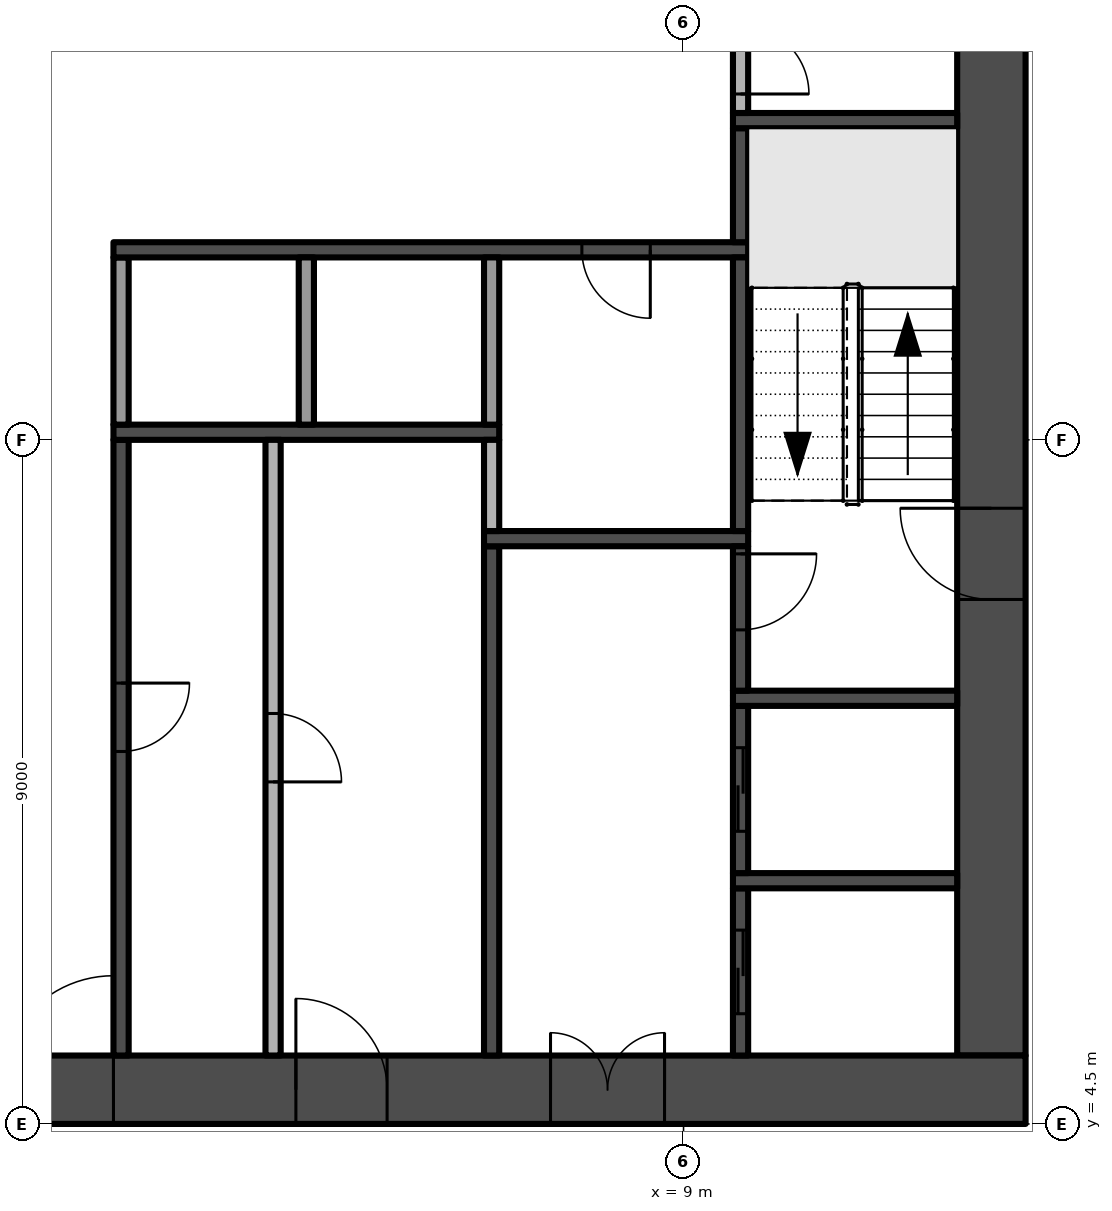
"""IFC4 building model, lengths in metres.
Left out: names, types, materials, properties, quantities, classifications, styles, units other than length and angle.
Written with IfcOpenShell. Run it as: python <this file> out.ifc"""

import sys

from ifc_helpers import new_model, si_unit, direction, frame, frame_2d, origin, place, context, subcontext, project, spatial, rectangle, extrude, element, fill, save


model = new_model("IFC4")
c1 = context("Model", 3, precision=1e-05, world=origin(), true_north=direction((0.0, 1.0)))
c2 = subcontext(c1, "Body", "Model", "MODEL_VIEW")
j1 = project(units=[si_unit("LENGTHUNIT", "METRE"), si_unit("PLANEANGLEUNIT", "RADIAN")], contexts=[c1])
p1 = place(None, origin())
s1 = spatial("IfcSite", under=j1, at=p1, CompositionType="ELEMENT")
p2 = place(p1, origin())
s2 = spatial("IfcBuilding", under=s1, at=p2, CompositionType="ELEMENT")
p3 = place(p2, frame((0.0, 0.0, 111.2)))
s3 = spatial("IfcBuildingStorey", under=s2, at=p3, CompositionType="ELEMENT", Elevation=111.2)
p4 = place(p3, frame((-13.5, 4.95, -0.3), z_axis=(0.0, 0.0, 1.0), x_axis=(1.0, 0.0, 0.0)))
e1 = element("IfcWall", 1, at=p4, inside=s3, PredefinedType="SHEAR", context=c2, shape_type="SweptSolid", body=[
    extrude(rectangle(XDim=27.0, YDim=0.9, at=frame_2d((13.5, 0.0))), origin(), (0.0, 0.0, 1.0), 3.8),
])
p5 = place(p4, frame((12.0, 0.0, 0.3)))
e2 = element("IfcOpeningElement", 2, at=p5, cuts=e1, PredefinedType="OPENING", context=c2, shape_type="SweptSolid", body=[
    extrude(rectangle(XDim=3.0, YDim=2.4, at=frame_2d((1.5, 1.2))), frame((0.0, 0.46, 0.0), z_axis=(0.0, -1.0, 0.0), x_axis=(1.0, 0.0, 0.0)), (0.0, 0.0, 1.0), 0.92),
])
p6 = place(p4, frame((4.9, 0.0, 0.3)))
e3 = element("IfcOpeningElement", 3, at=p6, cuts=e1, PredefinedType="OPENING", context=c2, shape_type="SweptSolid", body=[
    extrude(rectangle(XDim=1.2, YDim=2.2, at=frame_2d((0.6, 1.1))), frame((0.0, 0.46, 0.0), z_axis=(0.0, -1.0, 0.0), x_axis=(1.0, 0.0, 0.0)), (0.0, 0.0, 1.0), 0.92),
])
p7 = place(p4, frame((20.75, 0.0, 0.3)))
e4 = element("IfcOpeningElement", 4, at=p7, cuts=e1, PredefinedType="OPENING", context=c2, shape_type="SweptSolid", body=[
    extrude(rectangle(XDim=1.5, YDim=2.2, at=frame_2d((0.75, 1.1))), frame((0.0, 0.46, 0.0), z_axis=(0.0, -1.0, 0.0), x_axis=(1.0, 0.0, 0.0)), (0.0, 0.0, 1.0), 0.92),
])
p8 = place(p4, frame((17.4, 0.0, 0.3)))
e5 = element("IfcOpeningElement", 5, at=p8, cuts=e1, PredefinedType="OPENING", context=c2, shape_type="SweptSolid", body=[
    extrude(rectangle(XDim=1.2, YDim=2.2, at=frame_2d((0.6, 1.1))), frame((0.0, 0.46, 0.0), z_axis=(0.0, -1.0, 0.0), x_axis=(1.0, 0.0, 0.0)), (0.0, 0.0, 1.0), 0.92),
])
p9 = place(p3, frame((13.05, 5.4, -0.3), z_axis=(0.0, 0.0, 1.0), x_axis=(0.0, 1.0, 0.0)))
e6 = element("IfcWall", 6, at=p9, inside=s3, PredefinedType="SHEAR", context=c2, shape_type="SweptSolid", body=[
    extrude(rectangle(XDim=16.2, YDim=0.9, at=frame_2d((8.1, 0.0))), origin(), (0.0, 0.0, 1.0), 3.8),
])
p10 = place(p9, frame((6.0, 0.0, 0.3)))
e7 = element("IfcOpeningElement", 7, at=p10, cuts=e6, PredefinedType="OPENING", context=c2, shape_type="SweptSolid", body=[
    extrude(rectangle(XDim=1.2, YDim=2.2, at=frame_2d((0.6, 1.1))), frame((0.0, 0.46, 0.0), z_axis=(0.0, -1.0, 0.0), x_axis=(1.0, 0.0, 0.0)), (0.0, 0.0, 1.0), 0.92),
])
p11 = place(p3, frame((1.6, 13.5, 0.0), z_axis=(0.0, 0.0, 1.0), x_axis=(0.0, -1.0, 0.0)))
e8 = element("IfcWall", 8, at=p11, inside=s3, PredefinedType="SHEAR", context=c2, shape_type="SweptSolid", body=[
    extrude(rectangle(XDim=8.1, YDim=0.2, at=frame_2d((4.05, 0.0))), origin(), (0.0, 0.0, 1.0), 3.5),
])
p12 = place(p11, frame((3.2, 0.0, 0.0)))
e9 = element("IfcOpeningElement", 9, at=p12, cuts=e8, PredefinedType="OPENING", context=c2, shape_type="SweptSolid", body=[
    extrude(rectangle(XDim=0.9, YDim=2.1, at=frame_2d((0.45, 1.05))), frame((0.0, 0.11, 0.0), z_axis=(0.0, -1.0, 0.0), x_axis=(1.0, 0.0, 0.0)), (0.0, 0.0, 1.0), 0.22),
])
p13 = place(p3, frame((1.5, 13.6, 0.0), z_axis=(0.0, 0.0, 1.0), x_axis=(1.0, 0.0, 0.0)))
e10 = element("IfcWall", 10, at=p13, inside=s3, PredefinedType="SHEAR", context=c2, shape_type="SweptSolid", body=[
    extrude(rectangle(XDim=5.075, YDim=0.2, at=frame_2d((2.538, 0.0))), origin(), (0.0, 0.0, 1.0), 3.5),
])
p14 = place(p3, frame((1.6, 13.7, 0.0), z_axis=(0.0, 0.0, 1.0), x_axis=(0.0, 1.0, 0.0)))
e11 = element("IfcWall", 11, at=p14, inside=s3, PredefinedType="PARTITIONING", context=c2, shape_type="SweptSolid", body=[
    extrude(rectangle(XDim=2.2, YDim=0.2, at=frame_2d((1.1, 0.0))), origin(), (0.0, 0.0, 1.0), 3.5),
])
p15 = place(p3, frame((9.85, 16.0, 0.0), z_axis=(0.0, 0.0, 1.0), x_axis=(-1.0, 0.0, 0.0)))
e12 = element("IfcWall", 12, at=p15, inside=s3, PredefinedType="SHEAR", context=c2, shape_type="SweptSolid", body=[
    extrude(rectangle(XDim=8.35, YDim=0.2, at=frame_2d((4.175, 0.0))), origin(), (0.0, 0.0, 1.0), 3.5),
])
p16 = place(p15, frame((1.288, 0.0, 0.0)))
e13 = element("IfcOpeningElement", 13, at=p16, cuts=e12, PredefinedType="OPENING", context=c2, shape_type="SweptSolid", body=[
    extrude(rectangle(XDim=0.9, YDim=2.1, at=frame_2d((0.45, 1.05))), frame((0.0, 0.11, 0.0), z_axis=(0.0, -1.0, 0.0), x_axis=(1.0, 0.0, 0.0)), (0.0, 0.0, 1.0), 0.22),
])
p17 = place(p3, frame((3.6, 13.5, 0.0), z_axis=(0.0, 0.0, 1.0), x_axis=(0.0, -1.0, 0.0)))
e14 = element("IfcWall", 14, at=p17, inside=s3, PredefinedType="PARTITIONING", context=c2, shape_type="SweptSolid", body=[
    extrude(rectangle(XDim=8.1, YDim=0.2, at=frame_2d((4.05, 0.0))), origin(), (0.0, 0.0, 1.0), 3.5),
])
p18 = place(p17, frame((3.6, 0.0, 0.0)))
e15 = element("IfcOpeningElement", 15, at=p18, cuts=e14, PredefinedType="OPENING", context=c2, shape_type="SweptSolid", body=[
    extrude(rectangle(XDim=0.9, YDim=2.1, at=frame_2d((0.45, 1.05))), frame((0.0, 0.11, 0.0), z_axis=(0.0, -1.0, 0.0), x_axis=(1.0, 0.0, 0.0)), (0.0, 0.0, 1.0), 0.22),
])
p19 = place(p3, frame((4.037, 13.7, 0.0), z_axis=(0.0, 0.0, 1.0), x_axis=(0.0, 1.0, 0.0)))
e16 = element("IfcWall", 16, at=p19, inside=s3, PredefinedType="PARTITIONING", context=c2, shape_type="SweptSolid", body=[
    extrude(rectangle(XDim=2.2, YDim=0.2, at=frame_2d((1.1, 0.0))), origin(), (0.0, 0.0, 1.0), 3.5),
])
p20 = place(p3, frame((6.475, 5.4, 0.0), z_axis=(0.0, 0.0, 1.0), x_axis=(0.0, 1.0, 0.0)))
e17 = element("IfcWall", 17, at=p20, inside=s3, PredefinedType="SHEAR", context=c2, shape_type="SweptSolid", body=[
    extrude(rectangle(XDim=6.7, YDim=0.2, at=frame_2d((3.35, 0.0))), origin(), (0.0, 0.0, 1.0), 3.5),
])
p21 = place(p3, frame((6.375, 12.2, 0.0), z_axis=(0.0, 0.0, 1.0), x_axis=(1.0, 0.0, 0.0)))
e18 = element("IfcWall", 18, at=p21, inside=s3, PredefinedType="SHEAR", context=c2, shape_type="SweptSolid", body=[
    extrude(rectangle(XDim=3.475, YDim=0.2, at=frame_2d((1.738, 0.0))), origin(), (0.0, 0.0, 1.0), 3.5),
])
p22 = place(p3, frame((6.475, 12.3, 0.0), z_axis=(0.0, 0.0, 1.0), x_axis=(0.0, 1.0, 0.0)))
e19 = element("IfcWall", 19, at=p22, inside=s3, PredefinedType="PARTITIONING", context=c2, shape_type="SweptSolid", body=[
    extrude(rectangle(XDim=1.2, YDim=0.2, at=frame_2d((0.6, 0.0))), origin(), (0.0, 0.0, 1.0), 3.5),
])
p23 = place(p3, frame((6.475, 13.7, 0.0), z_axis=(0.0, 0.0, 1.0), x_axis=(0.0, 1.0, 0.0)))
e20 = element("IfcWall", 20, at=p23, inside=s3, PredefinedType="PARTITIONING", context=c2, shape_type="SweptSolid", body=[
    extrude(rectangle(XDim=2.2, YDim=0.2, at=frame_2d((1.1, 0.0))), origin(), (0.0, 0.0, 1.0), 3.5),
])
p24 = place(p3, frame((9.75, 5.4, 0.0), z_axis=(0.0, 0.0, 1.0), x_axis=(0.0, 1.0, 0.0)))
e21 = element("IfcWall", 21, at=p24, inside=s3, PredefinedType="SHEAR", context=c2, shape_type="SweptSolid", body=[
    extrude(rectangle(XDim=2.2, YDim=0.2, at=frame_2d((1.1, 0.0))), origin(), (0.0, 0.0, 1.0), 3.5),
])
p25 = place(p24, frame((0.55, 0.0, 0.0)))
e22 = element("IfcOpeningElement", 22, at=p25, cuts=e21, PredefinedType="OPENING", context=c2, shape_type="SweptSolid", body=[
    extrude(rectangle(XDim=1.1, YDim=2.1, at=frame_2d((0.55, 1.05))), frame((0.0, 0.11, 0.0), z_axis=(0.0, -1.0, 0.0), x_axis=(1.0, 0.0, 0.0)), (0.0, 0.0, 1.0), 0.22),
])
p26 = place(p3, frame((9.65, 7.7, 0.0), z_axis=(0.0, 0.0, 1.0), x_axis=(1.0, 0.0, 0.0)))
e23 = element("IfcWall", 23, at=p26, inside=s3, PredefinedType="SHEAR", context=c2, shape_type="SweptSolid", body=[
    extrude(rectangle(XDim=2.95, YDim=0.2, at=frame_2d((1.475, 0.0))), origin(), (0.0, 0.0, 1.0), 3.5),
])
p27 = place(p3, frame((9.75, 7.8, 0.0), z_axis=(0.0, 0.0, 1.0), x_axis=(0.0, 1.0, 0.0)))
e24 = element("IfcWall", 24, at=p27, inside=s3, PredefinedType="SHEAR", context=c2, shape_type="SweptSolid", body=[
    extrude(rectangle(XDim=2.2, YDim=0.2, at=frame_2d((1.1, 0.0))), origin(), (0.0, 0.0, 1.0), 3.5),
])
p28 = place(p27, frame((0.55, 0.0, 0.0)))
e25 = element("IfcOpeningElement", 25, at=p28, cuts=e24, PredefinedType="OPENING", context=c2, shape_type="SweptSolid", body=[
    extrude(rectangle(XDim=1.1, YDim=2.1, at=frame_2d((0.55, 1.05))), frame((0.0, 0.11, 0.0), z_axis=(0.0, -1.0, 0.0), x_axis=(1.0, 0.0, 0.0)), (0.0, 0.0, 1.0), 0.22),
])
p29 = place(p3, frame((9.65, 10.1, 0.0), z_axis=(0.0, 0.0, 1.0), x_axis=(1.0, 0.0, 0.0)))
e26 = element("IfcWall", 26, at=p29, inside=s3, PredefinedType="SHEAR", context=c2, shape_type="SweptSolid", body=[
    extrude(rectangle(XDim=2.95, YDim=0.2, at=frame_2d((1.475, 0.0))), origin(), (0.0, 0.0, 1.0), 3.5),
])
p30 = place(p3, frame((9.75, 12.1, 0.0), z_axis=(0.0, 0.0, 1.0), x_axis=(0.0, -1.0, 0.0)))
e27 = element("IfcWall", 27, at=p30, inside=s3, PredefinedType="SHEAR", context=c2, shape_type="SweptSolid", body=[
    extrude(rectangle(XDim=1.9, YDim=0.2, at=frame_2d((0.95, 0.0))), origin(), (0.0, 0.0, 1.0), 3.5),
])
p31 = place(p30, frame((0.1, 0.0, 0.0)))
e28 = element("IfcOpeningElement", 28, at=p31, cuts=e27, PredefinedType="OPENING", context=c2, shape_type="SweptSolid", body=[
    extrude(rectangle(XDim=1.0, YDim=2.2, at=frame_2d((0.5, 1.1))), frame((0.0, 0.11, 0.0), z_axis=(0.0, -1.0, 0.0), x_axis=(1.0, 0.0, 0.0)), (0.0, 0.0, 1.0), 0.22),
])
p32 = place(p3, frame((9.75, 12.3, 0.0), z_axis=(0.0, 0.0, 1.0), x_axis=(0.0, 1.0, 0.0)))
e29 = element("IfcWall", 29, at=p32, inside=s3, PredefinedType="SHEAR", context=c2, shape_type="SweptSolid", body=[
    extrude(rectangle(XDim=3.6, YDim=0.2, at=frame_2d((1.8, 0.0))), origin(), (0.0, 0.0, 1.0), 3.5),
])
p33 = place(p3, frame((9.75, 16.1, 0.0), z_axis=(0.0, 0.0, 1.0), x_axis=(0.0, 1.0, 0.0)))
e30 = element("IfcWall", 30, at=p33, inside=s3, PredefinedType="SHEAR", context=c2, shape_type="SweptSolid", body=[
    extrude(rectangle(XDim=1.5, YDim=0.2, at=frame_2d((0.75, 0.0))), origin(), (0.0, 0.0, 1.0), 3.5),
])
p34 = place(p3, frame((9.65, 17.7, 0.0), z_axis=(0.0, 0.0, 1.0), x_axis=(1.0, 0.0, 0.0)))
e31 = element("IfcWall", 31, at=p34, inside=s3, PredefinedType="SHEAR", context=c2, shape_type="SweptSolid", body=[
    extrude(rectangle(XDim=2.95, YDim=0.2, at=frame_2d((1.475, 0.0))), origin(), (0.0, 0.0, 1.0), 3.5),
])
p35 = place(p3, frame((9.75, 19.2, 0.0), z_axis=(0.0, 0.0, 1.0), x_axis=(0.0, -1.0, 0.0)))
e32 = element("IfcWall", 32, at=p35, inside=s3, PredefinedType="PARTITIONING", context=c2, shape_type="SweptSolid", body=[
    extrude(rectangle(XDim=1.4, YDim=0.2, at=frame_2d((0.7, 0.0))), origin(), (0.0, 0.0, 1.0), 3.5),
])
p36 = place(p35, frame((0.25, 0.0, 0.0)))
e33 = element("IfcOpeningElement", 33, at=p36, cuts=e32, PredefinedType="OPENING", context=c2, shape_type="SweptSolid", body=[
    extrude(rectangle(XDim=0.9, YDim=2.1, at=frame_2d((0.45, 1.05))), frame((0.0, 0.11, 0.0), z_axis=(0.0, -1.0, 0.0), x_axis=(1.0, 0.0, 0.0)), (0.0, 0.0, 1.0), 0.22),
])
p37 = place(p5, frame((3.0, 0.0, 0.0), z_axis=(0.0, 0.0, 1.0), x_axis=(-1.0, 0.0, 0.0)))
e34 = element("IfcDoor", 34, at=p37, inside=s3, OperationType="DOUBLE_DOOR_SINGLE_SWING", PredefinedType="DOOR", context=c2, shape_type="SweptSolid", body=[
    extrude(rectangle(XDim=3.0, YDim=2.4, at=frame_2d((1.5, 1.2))), frame((0.0, 0.025, 0.0), z_axis=(0.0, -1.0, 0.0), x_axis=(1.0, 0.0, 0.0)), (0.0, 0.0, 1.0), 0.05),
])
fill(e2, e34)
p38 = place(p10, frame((1.2, 0.0, 0.0), z_axis=(0.0, 0.0, 1.0), x_axis=(-1.0, 0.0, 0.0)))
e35 = element("IfcDoor", 35, at=p38, inside=s3, OperationType="SINGLE_SWING_LEFT", PredefinedType="DOOR", context=c2, shape_type="SweptSolid", body=[
    extrude(rectangle(XDim=1.2, YDim=2.2, at=frame_2d((0.6, 1.1))), frame((0.0, 0.025, 0.0), z_axis=(0.0, -1.0, 0.0), x_axis=(1.0, 0.0, 0.0)), (0.0, 0.0, 1.0), 0.05),
])
fill(e7, e35)
p39 = place(p7, frame((1.5, 0.0, 0.0), z_axis=(0.0, 0.0, 1.0), x_axis=(-1.0, 0.0, 0.0)))
e36 = element("IfcDoor", 36, at=p39, inside=s3, OperationType="DOUBLE_DOOR_SINGLE_SWING", PredefinedType="DOOR", context=c2, shape_type="SweptSolid", body=[
    extrude(rectangle(XDim=1.5, YDim=2.2, at=frame_2d((0.75, 1.1))), frame((0.0, 0.025, 0.0), z_axis=(0.0, -1.0, 0.0), x_axis=(1.0, 0.0, 0.0)), (0.0, 0.0, 1.0), 0.05),
])
fill(e4, e36)
p40 = place(p8, frame((1.2, 0.0, 0.0), z_axis=(0.0, 0.0, 1.0), x_axis=(-1.0, 0.0, 0.0)))
e37 = element("IfcDoor", 37, at=p40, inside=s3, OperationType="SINGLE_SWING_RIGHT", PredefinedType="DOOR", context=c2, shape_type="SweptSolid", body=[
    extrude(rectangle(XDim=1.2, YDim=2.2, at=frame_2d((0.6, 1.1))), frame((0.0, 0.025, 0.0), z_axis=(0.0, -1.0, 0.0), x_axis=(1.0, 0.0, 0.0)), (0.0, 0.0, 1.0), 0.05),
])
fill(e5, e37)
p41 = place(p31, origin())
e38 = element("IfcDoor", 38, at=p41, inside=s3, OperationType="SINGLE_SWING_LEFT", PredefinedType="DOOR", context=c2, shape_type="SweptSolid", body=[
    extrude(rectangle(XDim=1.0, YDim=2.2, at=frame_2d((0.5, 1.1))), frame((0.0, 0.025, 0.0), z_axis=(0.0, -1.0, 0.0), x_axis=(1.0, 0.0, 0.0)), (0.0, 0.0, 1.0), 0.05),
])
fill(e28, e38)
p42 = place(p25, origin())
e39 = element("IfcDoor", 39, at=p42, inside=s3, OperationType="SLIDING_TO_RIGHT", PredefinedType="DOOR", context=c2, shape_type="SweptSolid", body=[
    extrude(rectangle(XDim=1.1, YDim=2.1, at=frame_2d((0.55, 1.05))), frame((0.0, 0.025, 0.0), z_axis=(0.0, -1.0, 0.0), x_axis=(1.0, 0.0, 0.0)), (0.0, 0.0, 1.0), 0.05),
])
fill(e22, e39)
p43 = place(p28, origin())
e40 = element("IfcDoor", 40, at=p43, inside=s3, OperationType="SLIDING_TO_RIGHT", PredefinedType="DOOR", context=c2, shape_type="SweptSolid", body=[
    extrude(rectangle(XDim=1.1, YDim=2.1, at=frame_2d((0.55, 1.05))), frame((0.0, 0.025, 0.0), z_axis=(0.0, -1.0, 0.0), x_axis=(1.0, 0.0, 0.0)), (0.0, 0.0, 1.0), 0.05),
])
fill(e25, e40)
p44 = place(p12, origin())
e41 = element("IfcDoor", 41, at=p44, inside=s3, OperationType="SINGLE_SWING_LEFT", PredefinedType="DOOR", context=c2, shape_type="SweptSolid", body=[
    extrude(rectangle(XDim=0.9, YDim=2.1, at=frame_2d((0.45, 1.05))), frame((0.0, 0.025, 0.0), z_axis=(0.0, -1.0, 0.0), x_axis=(1.0, 0.0, 0.0)), (0.0, 0.0, 1.0), 0.05),
])
fill(e9, e41)
p45 = place(p16, origin())
e42 = element("IfcDoor", 42, at=p45, inside=s3, OperationType="SINGLE_SWING_LEFT", PredefinedType="DOOR", context=c2, shape_type="SweptSolid", body=[
    extrude(rectangle(XDim=0.9, YDim=2.1, at=frame_2d((0.45, 1.05))), frame((0.0, 0.025, 0.0), z_axis=(0.0, -1.0, 0.0), x_axis=(1.0, 0.0, 0.0)), (0.0, 0.0, 1.0), 0.05),
])
fill(e13, e42)
p46 = place(p36, origin())
e43 = element("IfcDoor", 43, at=p46, inside=s3, OperationType="SINGLE_SWING_RIGHT", PredefinedType="DOOR", context=c2, shape_type="SweptSolid", body=[
    extrude(rectangle(XDim=0.9, YDim=2.1, at=frame_2d((0.45, 1.05))), frame((0.0, 0.025, 0.0), z_axis=(0.0, -1.0, 0.0), x_axis=(1.0, 0.0, 0.0)), (0.0, 0.0, 1.0), 0.05),
])
fill(e33, e43)
p47 = place(p18, origin())
e44 = element("IfcDoor", 44, at=p47, inside=s3, OperationType="SINGLE_SWING_RIGHT", PredefinedType="DOOR", context=c2, shape_type="SweptSolid", body=[
    extrude(rectangle(XDim=0.9, YDim=2.1, at=frame_2d((0.45, 1.05))), frame((0.0, 0.025, 0.0), z_axis=(0.0, -1.0, 0.0), x_axis=(1.0, 0.0, 0.0)), (0.0, 0.0, 1.0), 0.05),
])
fill(e15, e44)
save(model, sys.argv[1])
